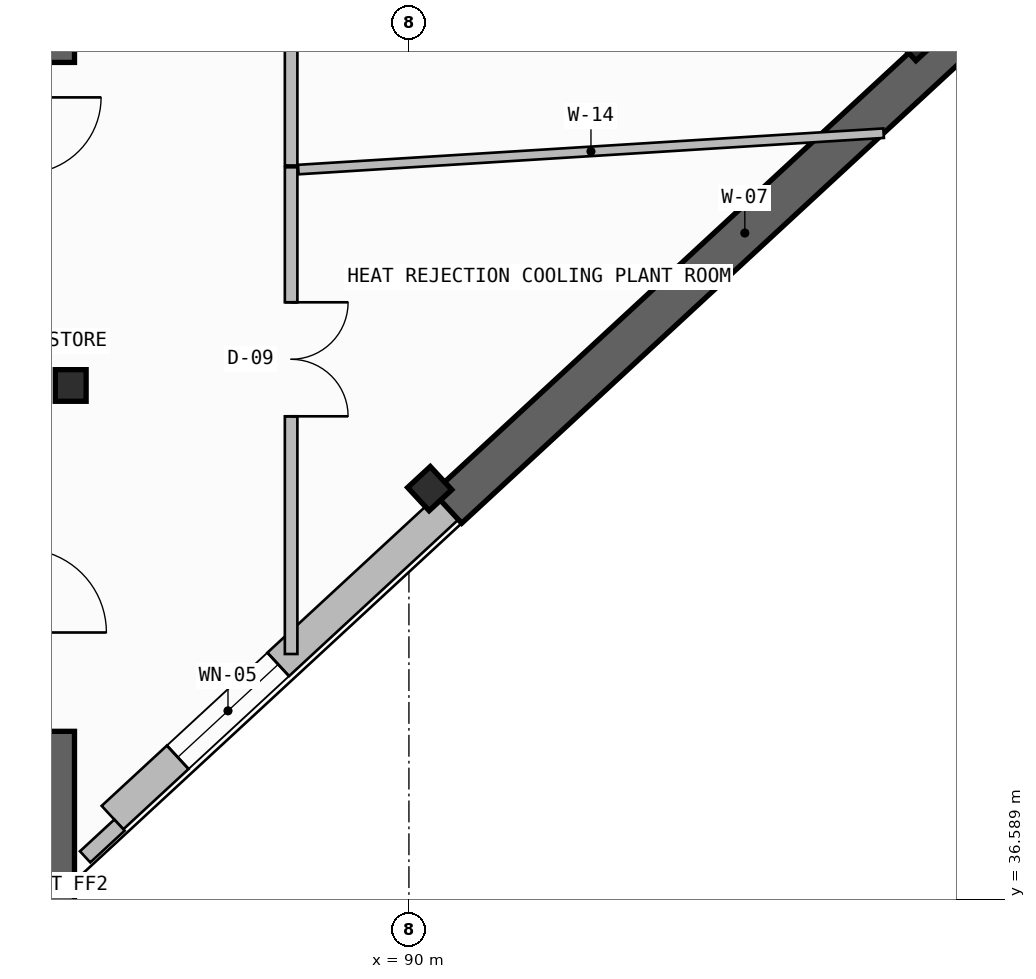
"""IFC4 building model, lengths in metres.
Left out: names, types, materials, properties, quantities, classifications, styles, units other than length and angle.
Written with IfcOpenShell. Run it as: python <this file> out.ifc"""

import sys

from ifc_helpers import new_model, si_unit, direction, frame, frame_2d, origin, origin_2d, place, context, subcontext, project, spatial, polyline, rectangle, i_section, outline, extrude, element, fill, save


model = new_model("IFC4")
c1 = context("Model", 3, precision=1e-05, world=origin(), true_north=direction((0.0, 1.0)))
c2 = subcontext(c1, "Body", "Model", "MODEL_VIEW")
j1 = project(units=[si_unit("LENGTHUNIT", "METRE"), si_unit("PLANEANGLEUNIT", "RADIAN")], contexts=[c1])
p1 = place(None, origin())
s1 = spatial("IfcSite", under=j1, at=p1, CompositionType="ELEMENT")
p2 = place(p1, origin())
s2 = spatial("IfcBuilding", under=s1, at=p2, CompositionType="ELEMENT")
p3 = place(p2, frame((0.0, 0.0, 302.98)))
s3 = spatial("IfcBuildingStorey", under=s2, at=p3, CompositionType="ELEMENT", Elevation=302.98)
p4 = place(p3, frame((85.3, 35.5, -0.2), z_axis=(0.0, 0.0, 1.0), x_axis=(0.0, 1.0, 0.0)))
e1 = element("IfcWall", 1, at=p4, inside=s3, PredefinedType="SHEAR", context=c2, shape_type="SweptSolid", body=[
    extrude(rectangle(XDim=3.3, YDim=0.6, at=frame_2d((1.65, 0.0))), origin(), (0.0, 0.0, 1.0), 4.8),
])
p5 = place(p3, frame((85.3, 47.6, -0.2), z_axis=(0.0, 0.0, 1.0), x_axis=(0.0, 1.0, 0.0)))
e2 = element("IfcWall", 2, at=p5, inside=s3, PredefinedType="SHEAR", context=c2, shape_type="SweptSolid", body=[
    extrude(rectangle(XDim=8.45, YDim=0.6, at=frame_2d((4.225, 0.0))), origin(), (0.0, 0.0, 1.0), 4.8),
])
for number, where, z_axis, x_axis in (
    (3, (85.55, 43.35, 0.0), (0.0, 0.0, 1.0), (1.0, 0.0, 0.0)),
    (4, (90.273, 41.993, 0.0), (0.0, 0.0, 1.0), (0.734, 0.679, 0.0)),
    (5, (96.679, 47.914, 0.0), (0.0, 0.0, 1.0), (0.734, 0.679, 0.0)),
):
    element("IfcColumn", number, at=place(p3, frame(where, z_axis=z_axis, x_axis=x_axis)), inside=s3, PredefinedType="COLUMN", context=c2, shape_type="SweptSolid", body=[
        extrude(i_section(OverallWidth=0.406, OverallDepth=0.416, WebThickness=0.03, FlangeThickness=0.048, FilletRadius=0.015, at=origin_2d()), origin(), (0.0, 0.0, 1.0), 4.8),
    ])
p6 = place(p3, frame((86.1, 37.665, 0.0), z_axis=(0.0, 0.0, 1.0), x_axis=(0.734321413343, 0.678801931277, 0.0)))
e6 = element("IfcWall", 6, at=p6, inside=s3, PredefinedType="SOLIDWALL", context=c2, shape_type="SweptSolid", body=[
    extrude(outline(polyline([(0.0, 0.0), (6.002, 0.0), (6.002, 4.6), (0.0, 4.6), (0.0, 0.0)])), frame((0.0, 0.21, 0.0), z_axis=(0.0, -1.0, 0.0), x_axis=(1.0, 0.0, 0.0)), (0.0, 0.0, 1.0), 0.42),
])
p7 = place(p6, frame((1.169, 0.0, 0.7)))
e7 = element("IfcOpeningElement", 7, at=p7, cuts=e6, PredefinedType="OPENING", context=c2, shape_type="SweptSolid", body=[
    extrude(rectangle(XDim=1.8, YDim=1.2, at=frame_2d((0.9, 0.6))), frame((0.0, 0.22, 0.0), z_axis=(0.0, -1.0, 0.0), x_axis=(1.0, 0.0, 0.0)), (0.0, 0.0, 1.0), 0.44),
])
p8 = place(p3, frame((90.508, 41.74, -0.2), z_axis=(0.0, 0.0, 1.0), x_axis=(0.734315848115, 0.678807951638, 0.0)))
e8 = element("IfcWall", 8, at=p8, inside=s3, PredefinedType="SHEAR", context=c2, shape_type="SweptSolid", body=[
    extrude(outline(polyline([(0.0, 0.0), (16.573, 0.0), (16.573, 4.8), (0.0, 4.8), (0.0, 0.0)])), frame((0.0, 0.275, 0.0), z_axis=(0.0, -1.0, 0.0), x_axis=(1.0, 0.0, 0.0)), (0.0, 0.0, 1.0), 0.55),
])
p9 = place(p8, frame((10.654, 0.0, 0.7)))
e9 = element("IfcOpeningElement", 9, at=p9, cuts=e8, PredefinedType="OPENING", context=c2, shape_type="SweptSolid", body=[
    extrude(rectangle(XDim=1.8, YDim=1.2, at=frame_2d((0.9, 0.6))), frame((0.0, 0.285, 0.0), z_axis=(0.0, -1.0, 0.0), x_axis=(1.0, 0.0, 0.0)), (0.0, 0.0, 1.0), 0.57),
])
p10 = place(p3, frame((86.192, 37.566, 0.0), z_axis=(0.0, 0.0, 1.0), x_axis=(-0.734346728958, -0.678774544064, 0.0)))
e10 = element("IfcWall", 10, at=p10, inside=s3, PredefinedType="PARAPET", context=c2, shape_type="SweptSolid", body=[
    extrude(rectangle(XDim=0.615, YDim=0.2, at=frame_2d((0.308, 0.0))), origin(), (0.0, 0.0, 1.0), 1.15),
])
p11 = place(p3, frame((88.45, 39.817, 0.0), z_axis=(0.0, 0.0, 1.0), x_axis=(0.0, 1.0, 0.0)))
e11 = element("IfcWall", 11, at=p11, inside=s3, PredefinedType="PARTITIONING", context=c2, shape_type="SweptSolid", body=[
    extrude(rectangle(XDim=6.404, YDim=0.165, at=frame_2d((3.202, 0.0))), origin(), (0.0, 0.0, 1.0), 4.085),
])
p12 = place(p11, frame((3.127, 0.0, 0.0)))
e12 = element("IfcOpeningElement", 12, at=p12, cuts=e11, PredefinedType="OPENING", context=c2, shape_type="SweptSolid", body=[
    extrude(rectangle(XDim=1.5, YDim=2.25, at=frame_2d((0.75, 1.125))), frame((0.0, 0.093, 0.0), z_axis=(0.0, -1.0, 0.0), x_axis=(1.0, 0.0, 0.0)), (0.0, 0.0, 1.0), 0.185),
])
p13 = place(p3, frame((88.544, 46.19, 0.0), z_axis=(0.0, 0.0, 1.0), x_axis=(0.998073207011, 0.062047348432, 0.0)))
e13 = element("IfcWall", 13, at=p13, inside=s3, PredefinedType="PARTITIONING", context=c2, shape_type="SweptSolid", body=[
    extrude(rectangle(XDim=7.716, YDim=0.125, at=frame_2d((3.858, 0.0))), origin(), (0.0, 0.0, 1.0), 3.585),
])
p14 = place(p3, frame((88.45, 46.244, 0.0), z_axis=(0.0, 0.0, 1.0), x_axis=(0.0, 1.0, 0.0)))
e14 = element("IfcWall", 14, at=p14, inside=s3, PredefinedType="PARTITIONING", context=c2, shape_type="SweptSolid", body=[
    extrude(rectangle(XDim=13.106, YDim=0.165, at=frame_2d((6.553, 0.0))), origin(), (0.0, 0.0, 1.0), 4.085),
])
p15 = place(p14, frame((5.803, 0.0, 0.0)))
e15 = element("IfcOpeningElement", 15, at=p15, cuts=e14, PredefinedType="OPENING", context=c2, shape_type="SweptSolid", body=[
    extrude(rectangle(XDim=1.5, YDim=2.25, at=frame_2d((0.75, 1.125))), frame((0.0, 0.093, 0.0), z_axis=(0.0, -1.0, 0.0), x_axis=(1.0, 0.0, 0.0)), (0.0, 0.0, 1.0), 0.185),
])
p16 = place(p7, origin())
e16 = element("IfcWindow", 16, at=p16, inside=s3, PartitioningType="SINGLE_PANEL", PredefinedType="WINDOW", context=c2, shape_type="SweptSolid", body=[
    extrude(rectangle(XDim=1.8, YDim=1.2, at=frame_2d((0.9, 0.6))), frame((0.0, 0.03, 0.0), z_axis=(0.0, -1.0, 0.0), x_axis=(1.0, 0.0, 0.0)), (0.0, 0.0, 1.0), 0.06),
])
fill(e7, e16)
p17 = place(p12, frame((1.5, 0.0, 0.0), z_axis=(0.0, 0.0, 1.0), x_axis=(-1.0, 0.0, 0.0)))
e17 = element("IfcDoor", 17, at=p17, inside=s3, OperationType="DOUBLE_DOOR_SINGLE_SWING", PredefinedType="DOOR", context=c2, shape_type="SweptSolid", body=[
    extrude(rectangle(XDim=1.5, YDim=2.25, at=frame_2d((0.75, 1.125))), frame((0.0, 0.025, 0.0), z_axis=(0.0, -1.0, 0.0), x_axis=(1.0, 0.0, 0.0)), (0.0, 0.0, 1.0), 0.05),
])
fill(e12, e17)
save(model, sys.argv[1])
